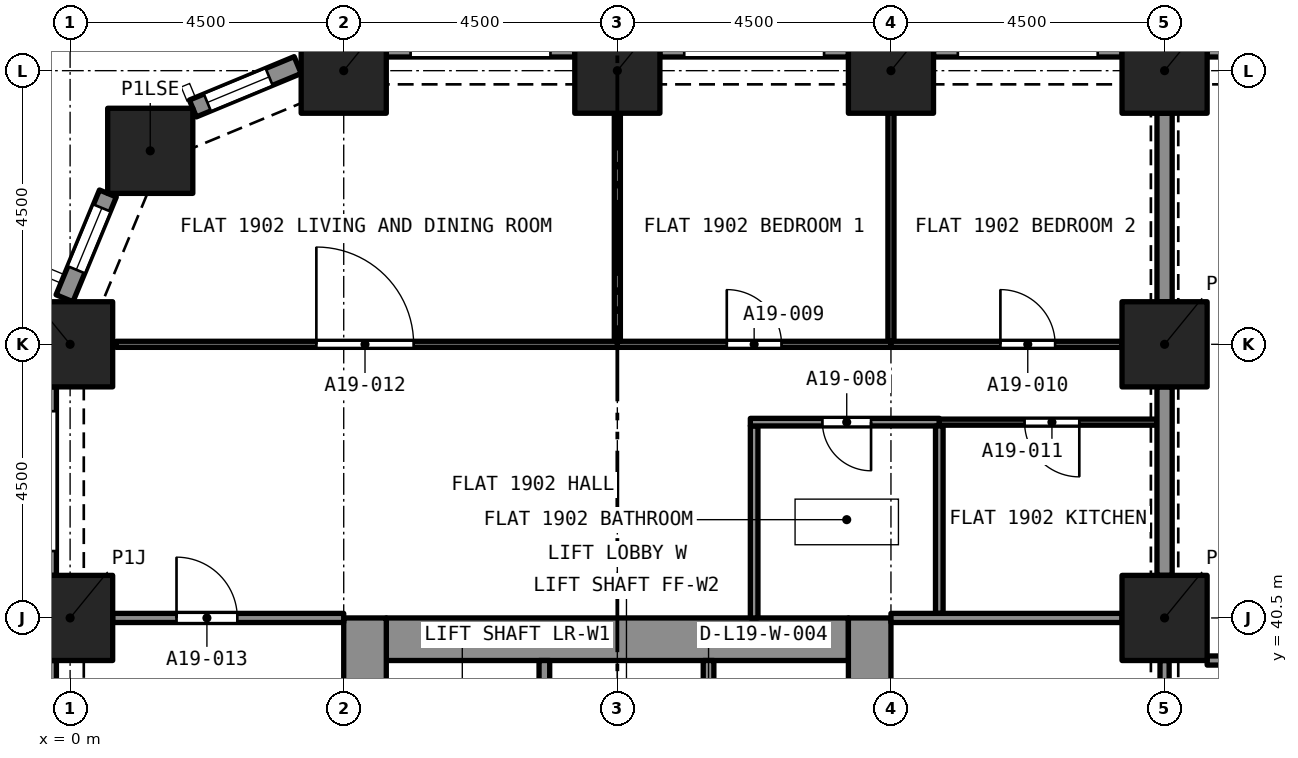
"""IFC4 building model, lengths in metres.
Left out: names, types, materials, properties, quantities, classifications, styles, units other than length and angle.
Written with IfcOpenShell. Run it as: python <this file> out.ifc"""

import sys

from ifc_helpers import new_model, si_unit, direction, frame, frame_2d, origin, origin_2d, place, context, subcontext, project, spatial, rectangle, extrude, element, fill, save


model = new_model("IFC4")
c1 = context("Model", 3, precision=1e-05, world=origin(), true_north=direction((0.0, 1.0)))
c2 = subcontext(c1, "Body", "Model", "MODEL_VIEW")
j1 = project(units=[si_unit("LENGTHUNIT", "METRE"), si_unit("PLANEANGLEUNIT", "RADIAN")], contexts=[c1])
p1 = place(None, origin())
s1 = spatial("IfcSite", under=j1, at=p1, CompositionType="ELEMENT")
p2 = place(p1, origin())
s2 = spatial("IfcBuilding", under=s1, at=p2, CompositionType="ELEMENT")
p3 = place(p2, frame((0.0, 0.0, 72.0)))
s3 = spatial("IfcBuildingStorey", under=s2, at=p3, CompositionType="ELEMENT", Elevation=72.0)
for number, where, z_axis, x_axis in (
    (1, (0.0, 40.5, 0.0), (0.0, 0.0, 1.0), (1.0, 0.0, 0.0)),
    (2, (18.0, 40.5, 0.0), (0.0, 0.0, 1.0), (1.0, 0.0, 0.0)),
    (3, (0.0, 45.0, 0.0), (0.0, 0.0, 1.0), (1.0, 0.0, 0.0)),
    (4, (18.0, 45.0, 0.0), (0.0, 0.0, 1.0), (1.0, 0.0, 0.0)),
    (5, (1.318, 48.182, 0.0), (0.0, 0.0, 1.0), (1.0, 0.0, 0.0)),
    (6, (4.5, 49.5, 0.0), (0.0, 0.0, 1.0), (1.0, 0.0, 0.0)),
    (7, (9.0, 49.5, 0.0), (0.0, 0.0, 1.0), (1.0, 0.0, 0.0)),
    (8, (13.5, 49.5, 0.0), (0.0, 0.0, 1.0), (1.0, 0.0, 0.0)),
    (9, (18.0, 49.5, 0.0), (0.0, 0.0, 1.0), (1.0, 0.0, 0.0)),
):
    element("IfcColumn", number, at=place(p3, frame(where, z_axis=z_axis, x_axis=x_axis)), inside=s3, PredefinedType="COLUMN", context=c2, shape_type="SweptSolid", body=[
        extrude(rectangle(XDim=1.4, YDim=1.4, at=origin_2d()), origin(), (0.0, 0.0, 1.0), 3.2),
    ])
p4 = place(p3, frame((5.2, 40.15, 0.0), z_axis=(0.0, 0.0, 1.0), x_axis=(1.0, 0.0, 0.0)))
e10 = element("IfcWall", 10, at=p4, inside=s3, PredefinedType="SOLIDWALL", context=c2, shape_type="SweptSolid", body=[
    extrude(rectangle(XDim=7.6, YDim=0.7, at=frame_2d((3.8, 0.0))), origin(), (0.0, 0.0, 1.0), 3.2),
])
p5 = place(p3, frame((4.85, 27.0, 0.0), z_axis=(0.0, 0.0, 1.0), x_axis=(0.0, 1.0, 0.0)))
e11 = element("IfcWall", 11, at=p5, inside=s3, PredefinedType="SOLIDWALL", context=c2, shape_type="SweptSolid", body=[
    extrude(rectangle(XDim=13.5, YDim=0.7, at=frame_2d((6.75, 0.0))), origin(), (0.0, 0.0, 1.0), 3.2),
])
p6 = place(p5, frame((8.95, 0.0, 0.0)))
e12 = element("IfcOpeningElement", 12, at=p6, cuts=e11, PredefinedType="OPENING", context=c2, shape_type="SweptSolid", body=[
    extrude(rectangle(XDim=1.2, YDim=2.1, at=frame_2d((0.6, 1.05))), frame((0.0, 0.36, 0.0), z_axis=(0.0, -1.0, 0.0), x_axis=(1.0, 0.0, 0.0)), (0.0, 0.0, 1.0), 0.72),
])
p7 = place(p3, frame((13.15, 27.0, 0.0), z_axis=(0.0, 0.0, 1.0), x_axis=(0.0, 1.0, 0.0)))
e13 = element("IfcWall", 13, at=p7, inside=s3, PredefinedType="SOLIDWALL", context=c2, shape_type="SweptSolid", body=[
    extrude(rectangle(XDim=13.5, YDim=0.7, at=frame_2d((6.75, 0.0))), origin(), (0.0, 0.0, 1.0), 3.2),
])
p8 = place(p7, frame((11.1, 0.0, 0.0)))
e14 = element("IfcOpeningElement", 14, at=p8, cuts=e13, PredefinedType="OPENING", context=c2, shape_type="SweptSolid", body=[
    extrude(rectangle(XDim=1.1, YDim=2.1, at=frame_2d((0.55, 1.05))), frame((0.0, 0.36, 0.0), z_axis=(0.0, -1.0, 0.0), x_axis=(1.0, 0.0, 0.0)), (0.0, 0.0, 1.0), 0.72),
])
p9 = place(p7, frame((8.95, 0.0, 0.0)))
e15 = element("IfcOpeningElement", 15, at=p9, cuts=e13, PredefinedType="OPENING", context=c2, shape_type="SweptSolid", body=[
    extrude(rectangle(XDim=1.2, YDim=2.1, at=frame_2d((0.6, 1.05))), frame((0.0, 0.36, 0.0), z_axis=(0.0, -1.0, 0.0), x_axis=(1.0, 0.0, 0.0)), (0.0, 0.0, 1.0), 0.72),
])
p10 = place(p3, frame((18.7, 49.875, 0.0), z_axis=(0.0, 0.0, 1.0), x_axis=(1.0, 0.0, 0.0)))
e16 = element("IfcWall", 16, at=p10, inside=s3, PredefinedType="SOLIDWALL", context=c2, shape_type="SweptSolid", body=[
    extrude(rectangle(XDim=3.1, YDim=0.3, at=frame_2d((1.55, 0.0))), origin(), (0.0, 0.0, 1.0), 3.2),
])
p11 = place(p10, frame((0.4, 0.0, 0.45)))
e17 = element("IfcOpeningElement", 17, at=p11, cuts=e16, PredefinedType="OPENING", context=c2, shape_type="SweptSolid", body=[
    extrude(rectangle(XDim=2.3, YDim=1.95, at=frame_2d((1.15, 0.975))), frame((0.0, 0.16, 0.0), z_axis=(0.0, -1.0, 0.0), x_axis=(1.0, 0.0, 0.0)), (0.0, 0.0, 1.0), 0.32),
])
p12 = place(p3, frame((14.2, 49.875, 0.0), z_axis=(0.0, 0.0, 1.0), x_axis=(1.0, 0.0, 0.0)))
e18 = element("IfcWall", 18, at=p12, inside=s3, PredefinedType="SOLIDWALL", context=c2, shape_type="SweptSolid", body=[
    extrude(rectangle(XDim=3.1, YDim=0.3, at=frame_2d((1.55, 0.0))), origin(), (0.0, 0.0, 1.0), 3.2),
])
p13 = place(p12, frame((0.4, 0.0, 0.45)))
e19 = element("IfcOpeningElement", 19, at=p13, cuts=e18, PredefinedType="OPENING", context=c2, shape_type="SweptSolid", body=[
    extrude(rectangle(XDim=2.3, YDim=1.95, at=frame_2d((1.15, 0.975))), frame((0.0, 0.16, 0.0), z_axis=(0.0, -1.0, 0.0), x_axis=(1.0, 0.0, 0.0)), (0.0, 0.0, 1.0), 0.32),
])
p14 = place(p3, frame((9.7, 49.875, 0.0), z_axis=(0.0, 0.0, 1.0), x_axis=(1.0, 0.0, 0.0)))
e20 = element("IfcWall", 20, at=p14, inside=s3, PredefinedType="SOLIDWALL", context=c2, shape_type="SweptSolid", body=[
    extrude(rectangle(XDim=3.1, YDim=0.3, at=frame_2d((1.55, 0.0))), origin(), (0.0, 0.0, 1.0), 3.2),
])
p15 = place(p14, frame((0.4, 0.0, 0.45)))
e21 = element("IfcOpeningElement", 21, at=p15, cuts=e20, PredefinedType="OPENING", context=c2, shape_type="SweptSolid", body=[
    extrude(rectangle(XDim=2.3, YDim=1.95, at=frame_2d((1.15, 0.975))), frame((0.0, 0.16, 0.0), z_axis=(0.0, -1.0, 0.0), x_axis=(1.0, 0.0, 0.0)), (0.0, 0.0, 1.0), 0.32),
])
p16 = place(p3, frame((5.2, 49.875, 0.0), z_axis=(0.0, 0.0, 1.0), x_axis=(1.0, 0.0, 0.0)))
e22 = element("IfcWall", 22, at=p16, inside=s3, PredefinedType="SOLIDWALL", context=c2, shape_type="SweptSolid", body=[
    extrude(rectangle(XDim=3.1, YDim=0.3, at=frame_2d((1.55, 0.0))), origin(), (0.0, 0.0, 1.0), 3.2),
])
p17 = place(p16, frame((0.4, 0.0, 0.45)))
e23 = element("IfcOpeningElement", 23, at=p17, cuts=e22, PredefinedType="OPENING", context=c2, shape_type="SweptSolid", body=[
    extrude(rectangle(XDim=2.3, YDim=1.95, at=frame_2d((1.15, 0.975))), frame((0.0, 0.16, 0.0), z_axis=(0.0, -1.0, 0.0), x_axis=(1.0, 0.0, 0.0)), (0.0, 0.0, 1.0), 0.32),
])
p18 = place(p3, frame((2.02, 48.878, 0.0), z_axis=(0.0, 0.0, 1.0), x_axis=(0.923903565336, 0.38262540684, 0.0)))
e24 = element("IfcWall", 24, at=p18, inside=s3, PredefinedType="SOLIDWALL", context=c2, shape_type="SweptSolid", body=[
    extrude(rectangle(XDim=1.865, YDim=0.3, at=frame_2d((0.933, 0.0))), origin(), (0.0, 0.0, 1.0), 3.2),
])
p19 = place(p18, frame((0.258, 0.0, 0.45)))
e25 = element("IfcOpeningElement", 25, at=p19, cuts=e24, PredefinedType="OPENING", context=c2, shape_type="SweptSolid", body=[
    extrude(rectangle(XDim=1.1, YDim=1.95, at=frame_2d((0.55, 0.975))), frame((0.0, 0.16, 0.0), z_axis=(0.0, -1.0, 0.0), x_axis=(1.0, 0.0, 0.0)), (0.0, 0.0, 1.0), 0.32),
])
p20 = place(p3, frame((-0.092, 45.757, 0.0), z_axis=(0.0, 0.0, 1.0), x_axis=(0.382737135771, 0.923857286003, 0.0)))
e26 = element("IfcWall", 26, at=p20, inside=s3, PredefinedType="SOLIDWALL", context=c2, shape_type="SweptSolid", body=[
    extrude(rectangle(XDim=1.865, YDim=0.3, at=frame_2d((0.933, 0.0))), origin(), (0.0, 0.0, 1.0), 3.2),
])
p21 = place(p20, frame((0.508, 0.0, 0.45)))
e27 = element("IfcOpeningElement", 27, at=p21, cuts=e26, PredefinedType="OPENING", context=c2, shape_type="SweptSolid", body=[
    extrude(rectangle(XDim=1.1, YDim=1.95, at=frame_2d((0.55, 0.975))), frame((0.0, 0.16, 0.0), z_axis=(0.0, -1.0, 0.0), x_axis=(1.0, 0.0, 0.0)), (0.0, 0.0, 1.0), 0.32),
])
p22 = place(p3, frame((-0.375, 41.2, 0.0), z_axis=(0.0, 0.0, 1.0), x_axis=(0.0, 1.0, 0.0)))
e28 = element("IfcWall", 28, at=p22, inside=s3, PredefinedType="SOLIDWALL", context=c2, shape_type="SweptSolid", body=[
    extrude(rectangle(XDim=3.1, YDim=0.3, at=frame_2d((1.55, 0.0))), origin(), (0.0, 0.0, 1.0), 3.2),
])
p23 = place(p22, frame((0.4, 0.0, 0.45)))
e29 = element("IfcOpeningElement", 29, at=p23, cuts=e28, PredefinedType="OPENING", context=c2, shape_type="SweptSolid", body=[
    extrude(rectangle(XDim=2.3, YDim=1.95, at=frame_2d((1.15, 0.975))), frame((0.0, 0.16, 0.0), z_axis=(0.0, -1.0, 0.0), x_axis=(1.0, 0.0, 0.0)), (0.0, 0.0, 1.0), 0.32),
])
p24 = place(p3, frame((-0.375, 36.7, 0.0), z_axis=(0.0, 0.0, 1.0), x_axis=(0.0, 1.0, 0.0)))
e30 = element("IfcWall", 30, at=p24, inside=s3, PredefinedType="SOLIDWALL", context=c2, shape_type="SweptSolid", body=[
    extrude(rectangle(XDim=3.1, YDim=0.3, at=frame_2d((1.55, 0.0))), origin(), (0.0, 0.0, 1.0), 3.2),
])
p25 = place(p24, frame((0.4, 0.0, 0.45)))
e31 = element("IfcOpeningElement", 31, at=p25, cuts=e30, PredefinedType="OPENING", context=c2, shape_type="SweptSolid", body=[
    extrude(rectangle(XDim=2.3, YDim=1.95, at=frame_2d((1.15, 0.975))), frame((0.0, 0.16, 0.0), z_axis=(0.0, -1.0, 0.0), x_axis=(1.0, 0.0, 0.0)), (0.0, 0.0, 1.0), 0.32),
])
p26 = place(p3, frame((11.25, 40.5, 0.0), z_axis=(0.0, 0.0, 1.0), x_axis=(0.0, 1.0, 0.0)))
e32 = element("IfcWall", 32, at=p26, inside=s3, PredefinedType="PARTITIONING", context=c2, shape_type="SweptSolid", body=[
    extrude(rectangle(XDim=3.157, YDim=0.125, at=frame_2d((1.579, 0.0))), origin(), (0.0, 0.0, 1.0), 2.7),
])
p27 = place(p3, frame((14.295, 43.72, 0.0), z_axis=(0.0, 0.0, 1.0), x_axis=(-1.0, 0.0, 0.0)))
e33 = element("IfcWall", 33, at=p27, inside=s3, PredefinedType="PARTITIONING", context=c2, shape_type="SweptSolid", body=[
    extrude(rectangle(XDim=3.108, YDim=0.125, at=frame_2d((1.554, 0.0))), origin(), (0.0, 0.0, 1.0), 2.7),
])
p28 = place(p27, frame((1.123, 0.0, 0.0)))
e34 = element("IfcOpeningElement", 34, at=p28, cuts=e33, PredefinedType="OPENING", context=c2, shape_type="SweptSolid", body=[
    extrude(rectangle(XDim=0.8, YDim=2.1, at=frame_2d((0.4, 1.05))), frame((0.0, 0.073, 0.0), z_axis=(0.0, -1.0, 0.0), x_axis=(1.0, 0.0, 0.0)), (0.0, 0.0, 1.0), 0.145),
])
p29 = place(p3, frame((14.295, 40.575, 0.0), z_axis=(0.0, 0.0, 1.0), x_axis=(0.0, 1.0, 0.0)))
e35 = element("IfcWall", 35, at=p29, inside=s3, PredefinedType="PARTITIONING", context=c2, shape_type="SweptSolid", body=[
    extrude(rectangle(XDim=3.083, YDim=0.125, at=frame_2d((1.541, 0.0))), origin(), (0.0, 0.0, 1.0), 2.7),
])
p30 = place(p3, frame((13.5, 40.5, 0.0), z_axis=(0.0, 0.0, 1.0), x_axis=(1.0, 0.0, 0.0)))
e36 = element("IfcWall", 36, at=p30, inside=s3, PredefinedType="PARTITIONING", context=c2, shape_type="SweptSolid", body=[
    extrude(rectangle(XDim=3.8, YDim=0.15, at=frame_2d((1.9, 0.0))), origin(), (0.0, 0.0, 1.0), 2.7),
])
p31 = place(p3, frame((13.5, 45.05, 0.0), z_axis=(0.0, 0.0, 1.0), x_axis=(0.0, 1.0, 0.0)))
e37 = element("IfcWall", 37, at=p31, inside=s3, PredefinedType="PARTITIONING", context=c2, shape_type="SweptSolid", body=[
    extrude(rectangle(XDim=3.75, YDim=0.1, at=frame_2d((1.875, 0.0))), origin(), (0.0, 0.0, 1.0), 2.7),
])
p32 = place(p3, frame((9.0, 45.0, 0.0), z_axis=(0.0, 0.0, 1.0), x_axis=(1.0, 0.0, 0.0)))
e38 = element("IfcWall", 38, at=p32, inside=s3, PredefinedType="PARTITIONING", context=c2, shape_type="SweptSolid", body=[
    extrude(rectangle(XDim=4.5, YDim=0.1, at=frame_2d((2.25, 0.0))), origin(), (0.0, 0.0, 1.0), 2.7),
])
p33 = place(p32, frame((1.8, 0.0, 0.0)))
e39 = element("IfcOpeningElement", 39, at=p33, cuts=e38, PredefinedType="OPENING", context=c2, shape_type="SweptSolid", body=[
    extrude(rectangle(XDim=0.9, YDim=2.1, at=frame_2d((0.45, 1.05))), frame((0.0, 0.06, 0.0), z_axis=(0.0, -1.0, 0.0), x_axis=(1.0, 0.0, 0.0)), (0.0, 0.0, 1.0), 0.12),
])
p34 = place(p3, frame((9.0, 45.05, 0.0), z_axis=(0.0, 0.0, 1.0), x_axis=(0.0, 1.0, 0.0)))
e40 = element("IfcWall", 40, at=p34, inside=s3, PredefinedType="PARTITIONING", context=c2, shape_type="SweptSolid", body=[
    extrude(rectangle(XDim=3.75, YDim=0.1, at=frame_2d((1.875, 0.0))), origin(), (0.0, 0.0, 1.0), 2.7),
])
p35 = place(p3, frame((13.5, 45.0, 0.0), z_axis=(0.0, 0.0, 1.0), x_axis=(1.0, 0.0, 0.0)))
e41 = element("IfcWall", 41, at=p35, inside=s3, PredefinedType="PARTITIONING", context=c2, shape_type="SweptSolid", body=[
    extrude(rectangle(XDim=3.8, YDim=0.1, at=frame_2d((1.9, 0.0))), origin(), (0.0, 0.0, 1.0), 2.7),
])
p36 = place(p35, frame((1.8, 0.0, 0.0)))
e42 = element("IfcOpeningElement", 42, at=p36, cuts=e41, PredefinedType="OPENING", context=c2, shape_type="SweptSolid", body=[
    extrude(rectangle(XDim=0.9, YDim=2.1, at=frame_2d((0.45, 1.05))), frame((0.0, 0.06, 0.0), z_axis=(0.0, -1.0, 0.0), x_axis=(1.0, 0.0, 0.0)), (0.0, 0.0, 1.0), 0.12),
])
p37 = place(p3, frame((18.0, 45.7, 0.0), z_axis=(0.0, 0.0, 1.0), x_axis=(0.0, 1.0, 0.0)))
e43 = element("IfcWall", 43, at=p37, inside=s3, PredefinedType="PARTITIONING", context=c2, shape_type="SweptSolid", body=[
    extrude(rectangle(XDim=3.1, YDim=0.25, at=frame_2d((1.55, 0.0))), origin(), (0.0, 0.0, 1.0), 2.38),
])
p38 = place(p3, frame((17.875, 43.72, 0.0), z_axis=(0.0, 0.0, 1.0), x_axis=(-1.0, 0.0, 0.0)))
e44 = element("IfcWall", 44, at=p38, inside=s3, PredefinedType="PARTITIONING", context=c2, shape_type="SweptSolid", body=[
    extrude(rectangle(XDim=3.58, YDim=0.1, at=frame_2d((1.79, 0.0))), origin(), (0.0, 0.0, 1.0), 2.7),
])
p39 = place(p38, frame((1.277, 0.0, 0.0)))
e45 = element("IfcOpeningElement", 45, at=p39, cuts=e44, PredefinedType="OPENING", context=c2, shape_type="SweptSolid", body=[
    extrude(rectangle(XDim=0.9, YDim=2.1, at=frame_2d((0.45, 1.05))), frame((0.0, 0.06, 0.0), z_axis=(0.0, -1.0, 0.0), x_axis=(1.0, 0.0, 0.0)), (0.0, 0.0, 1.0), 0.12),
])
p40 = place(p3, frame((0.758, 45.0, 0.0), z_axis=(0.0, 0.0, 1.0), x_axis=(1.0, 0.0, 0.0)))
e46 = element("IfcWall", 46, at=p40, inside=s3, PredefinedType="PARTITIONING", context=c2, shape_type="SweptSolid", body=[
    extrude(rectangle(XDim=8.242, YDim=0.1, at=frame_2d((4.121, 0.0))), origin(), (0.0, 0.0, 1.0), 2.7),
])
p41 = place(p40, frame((3.292, 0.0, 0.0)))
e47 = element("IfcOpeningElement", 47, at=p41, cuts=e46, PredefinedType="OPENING", context=c2, shape_type="SweptSolid", body=[
    extrude(rectangle(XDim=1.6, YDim=2.1, at=frame_2d((0.8, 1.05))), frame((0.0, 0.06, 0.0), z_axis=(0.0, -1.0, 0.0), x_axis=(1.0, 0.0, 0.0)), (0.0, 0.0, 1.0), 0.12),
])
p42 = place(p3, frame((0.7, 40.5, 0.0), z_axis=(0.0, 0.0, 1.0), x_axis=(1.0, 0.0, 0.0)))
e48 = element("IfcWall", 48, at=p42, inside=s3, PredefinedType="PARTITIONING", context=c2, shape_type="SweptSolid", body=[
    extrude(rectangle(XDim=3.8, YDim=0.15, at=frame_2d((1.9, 0.0))), origin(), (0.0, 0.0, 1.0), 2.7),
])
p43 = place(p42, frame((1.05, 0.0, 0.0)))
e49 = element("IfcOpeningElement", 49, at=p43, cuts=e48, PredefinedType="OPENING", context=c2, shape_type="SweptSolid", body=[
    extrude(rectangle(XDim=1.0, YDim=2.1, at=frame_2d((0.5, 1.05))), frame((0.0, 0.085, 0.0), z_axis=(0.0, -1.0, 0.0), x_axis=(1.0, 0.0, 0.0)), (0.0, 0.0, 1.0), 0.17),
])
p44 = place(p3, frame((18.0, 41.2, 0.0), z_axis=(0.0, 0.0, 1.0), x_axis=(0.0, 1.0, 0.0)))
e50 = element("IfcWall", 50, at=p44, inside=s3, PredefinedType="PARTITIONING", context=c2, shape_type="SweptSolid", body=[
    extrude(rectangle(XDim=3.1, YDim=0.25, at=frame_2d((1.55, 0.0))), origin(), (0.0, 0.0, 1.0), 2.38),
])
p45 = place(p3, frame((18.7, 39.8, 0.0), z_axis=(0.0, 0.0, 1.0), x_axis=(1.0, 0.0, 0.0)))
e51 = element("IfcWall", 51, at=p45, inside=s3, PredefinedType="PARTITIONING", context=c2, shape_type="SweptSolid", body=[
    extrude(rectangle(XDim=12.1, YDim=0.15, at=frame_2d((6.05, 0.0))), origin(), (0.0, 0.0, 1.0), 2.7),
])
p46 = place(p45, frame((5.55, 0.0, 0.0)))
e52 = element("IfcOpeningElement", 52, at=p46, cuts=e51, PredefinedType="OPENING", context=c2, shape_type="SweptSolid", body=[
    extrude(rectangle(XDim=1.0, YDim=2.1, at=frame_2d((0.5, 1.05))), frame((0.0, 0.085, 0.0), z_axis=(0.0, -1.0, 0.0), x_axis=(1.0, 0.0, 0.0)), (0.0, 0.0, 1.0), 0.17),
])
p47 = place(p3, frame((18.0, 39.8, 0.0), z_axis=(0.0, 0.0, 1.0), x_axis=(0.0, -1.0, 0.0)))
e53 = element("IfcWall", 53, at=p47, inside=s3, PredefinedType="PARTITIONING", context=c2, shape_type="SweptSolid", body=[
    extrude(rectangle(XDim=3.1, YDim=0.15, at=frame_2d((1.55, 0.0))), origin(), (0.0, 0.0, 1.0), 2.38),
])
p48 = place(p47, frame((0.95, 0.0, 0.0)))
e54 = element("IfcOpeningElement", 54, at=p48, cuts=e53, PredefinedType="OPENING", context=c2, shape_type="SweptSolid", body=[
    extrude(rectangle(XDim=1.2, YDim=2.1, at=frame_2d((0.6, 1.05))), frame((0.0, 0.085, 0.0), z_axis=(0.0, -1.0, 0.0), x_axis=(1.0, 0.0, 0.0)), (0.0, 0.0, 1.0), 0.17),
])
p49 = place(p3, frame((7.8, 37.5, 0.0), z_axis=(0.0, 0.0, 1.0), x_axis=(0.0, 1.0, 0.0)))
e55 = element("IfcWall", 55, at=p49, inside=s3, PredefinedType="SOLIDWALL", context=c2, shape_type="SweptSolid", body=[
    extrude(rectangle(XDim=2.3, YDim=0.175, at=frame_2d((1.15, 0.0))), origin(), (0.0, 0.0, 1.0), 2.7),
])
p50 = place(p3, frame((10.5, 37.5, 0.0), z_axis=(0.0, 0.0, 1.0), x_axis=(0.0, 1.0, 0.0)))
e56 = element("IfcWall", 56, at=p50, inside=s3, PredefinedType="SOLIDWALL", context=c2, shape_type="SweptSolid", body=[
    extrude(rectangle(XDim=2.3, YDim=0.175, at=frame_2d((1.15, 0.0))), origin(), (0.0, 0.0, 1.0), 2.7),
])
p51 = place(p50, frame((0.65, 0.0, 0.0)))
e57 = element("IfcOpeningElement", 57, at=p51, cuts=e56, PredefinedType="OPENING", context=c2, shape_type="SweptSolid", body=[
    extrude(rectangle(XDim=1.0, YDim=2.1, at=frame_2d((0.5, 1.05))), frame((0.0, 0.097, 0.0), z_axis=(0.0, -1.0, 0.0), x_axis=(1.0, 0.0, 0.0)), (0.0, 0.0, 1.0), 0.195),
])
p52 = place(p19, origin())
e58 = element("IfcWindow", 58, at=p52, inside=s3, PartitioningType="SINGLE_PANEL", PredefinedType="WINDOW", context=c2, shape_type="SweptSolid", body=[
    extrude(rectangle(XDim=1.1, YDim=1.95, at=frame_2d((0.55, 0.975))), frame((0.0, 0.03, 0.0), z_axis=(0.0, -1.0, 0.0), x_axis=(1.0, 0.0, 0.0)), (0.0, 0.0, 1.0), 0.06),
])
fill(e25, e58)
p53 = place(p21, origin())
e59 = element("IfcWindow", 59, at=p53, inside=s3, PartitioningType="SINGLE_PANEL", PredefinedType="WINDOW", context=c2, shape_type="SweptSolid", body=[
    extrude(rectangle(XDim=1.1, YDim=1.95, at=frame_2d((0.55, 0.975))), frame((0.0, 0.03, 0.0), z_axis=(0.0, -1.0, 0.0), x_axis=(1.0, 0.0, 0.0)), (0.0, 0.0, 1.0), 0.06),
])
fill(e27, e59)
p54 = place(p28, origin())
e60 = element("IfcDoor", 60, at=p54, inside=s3, OperationType="SINGLE_SWING_LEFT", PredefinedType="DOOR", context=c2, shape_type="SweptSolid", body=[
    extrude(rectangle(XDim=0.8, YDim=2.1, at=frame_2d((0.4, 1.05))), frame((0.0, 0.025, 0.0), z_axis=(0.0, -1.0, 0.0), x_axis=(1.0, 0.0, 0.0)), (0.0, 0.0, 1.0), 0.05),
])
fill(e34, e60)
p55 = place(p33, origin())
e61 = element("IfcDoor", 61, at=p55, inside=s3, OperationType="SINGLE_SWING_LEFT", PredefinedType="DOOR", context=c2, shape_type="SweptSolid", body=[
    extrude(rectangle(XDim=0.9, YDim=2.1, at=frame_2d((0.45, 1.05))), frame((0.0, 0.025, 0.0), z_axis=(0.0, -1.0, 0.0), x_axis=(1.0, 0.0, 0.0)), (0.0, 0.0, 1.0), 0.05),
])
fill(e39, e61)
p56 = place(p36, origin())
e62 = element("IfcDoor", 62, at=p56, inside=s3, OperationType="SINGLE_SWING_RIGHT", PredefinedType="DOOR", context=c2, shape_type="SweptSolid", body=[
    extrude(rectangle(XDim=0.9, YDim=2.1, at=frame_2d((0.45, 1.05))), frame((0.0, 0.025, 0.0), z_axis=(0.0, -1.0, 0.0), x_axis=(1.0, 0.0, 0.0)), (0.0, 0.0, 1.0), 0.05),
])
fill(e42, e62)
p57 = place(p39, origin())
e63 = element("IfcDoor", 63, at=p57, inside=s3, OperationType="SINGLE_SWING_LEFT", PredefinedType="DOOR", context=c2, shape_type="SweptSolid", body=[
    extrude(rectangle(XDim=0.9, YDim=2.1, at=frame_2d((0.45, 1.05))), frame((0.0, 0.025, 0.0), z_axis=(0.0, -1.0, 0.0), x_axis=(1.0, 0.0, 0.0)), (0.0, 0.0, 1.0), 0.05),
])
fill(e45, e63)
p58 = place(p41, origin())
e64 = element("IfcDoor", 64, at=p58, inside=s3, OperationType="SINGLE_SWING_LEFT", PredefinedType="DOOR", context=c2, shape_type="SweptSolid", body=[
    extrude(rectangle(XDim=1.6, YDim=2.1, at=frame_2d((0.8, 1.05))), frame((0.0, 0.025, 0.0), z_axis=(0.0, -1.0, 0.0), x_axis=(1.0, 0.0, 0.0)), (0.0, 0.0, 1.0), 0.05),
])
fill(e47, e64)
p59 = place(p43, origin())
e65 = element("IfcDoor", 65, at=p59, inside=s3, OperationType="SINGLE_SWING_LEFT", PredefinedType="DOOR", context=c2, shape_type="SweptSolid", body=[
    extrude(rectangle(XDim=1.0, YDim=2.1, at=frame_2d((0.5, 1.05))), frame((0.0, 0.025, 0.0), z_axis=(0.0, -1.0, 0.0), x_axis=(1.0, 0.0, 0.0)), (0.0, 0.0, 1.0), 0.05),
])
fill(e49, e65)
save(model, sys.argv[1])
